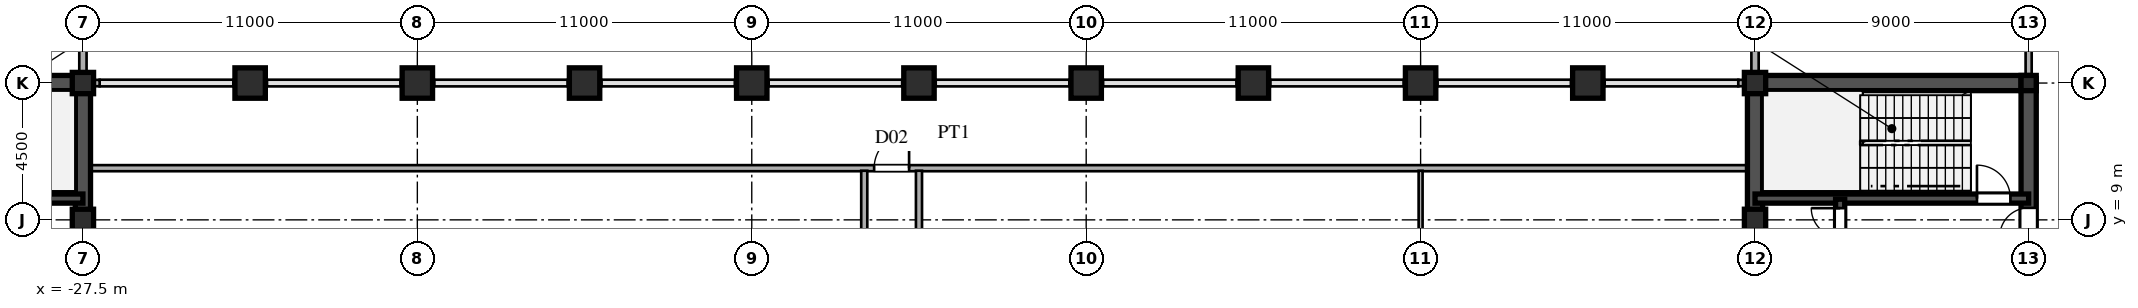
"""IFC4 building model, lengths in metres.
Left out: names, types, materials, properties, quantities, classifications, styles, units other than length and angle.
Written with IfcOpenShell. Run it as: python <this file> out.ifc"""

import sys

from ifc_helpers import new_model, si_unit, direction, frame, frame_2d, origin, origin_2d, place, context, subcontext, project, spatial, rectangle, hollow_rectangle, i_section, extrude, source, transform, mapped, element, fill, save


model = new_model("IFC4")
c1 = context("Model", 3, precision=1e-05, world=origin(), true_north=direction((0.0, 1.0)))
c2 = subcontext(c1, "Body", "Model", "MODEL_VIEW")
j1 = project(units=[si_unit("LENGTHUNIT", "METRE"), si_unit("PLANEANGLEUNIT", "RADIAN")], contexts=[c1])
p1 = place(None, origin())
s1 = spatial("IfcSite", under=j1, at=p1, CompositionType="ELEMENT")
p2 = place(p1, origin())
s2 = spatial("IfcBuilding", under=s1, at=p2, CompositionType="ELEMENT")
p3 = place(p2, frame((0.0, 0.0, 229.8)))
s3 = spatial("IfcBuildingStorey", under=s2, at=p3, CompositionType="ELEMENT", Elevation=229.8)
m1 = source(origin(), c2, "Body", "SweptSolid", [
    extrude(hollow_rectangle(XDim=0.7, YDim=0.7, WallThickness=0.03, at=origin_2d()), origin(), (0.0, 0.0, 1.0), 4.8),
])
for number, where, z_axis, x_axis in (
    (1, (-27.5, 9.0, 0.0), (0.0, 0.0, 1.0), (1.0, 0.0, 0.0)),
    (2, (-27.5, 13.5, 0.0), (0.0, 0.0, 1.0), (1.0, 0.0, 0.0)),
    (3, (27.5, 9.0, 0.0), (0.0, 0.0, 1.0), (1.0, 0.0, 0.0)),
    (4, (27.5, 13.5, 0.0), (0.0, 0.0, 1.0), (1.0, 0.0, 0.0)),
):
    element("IfcColumn", number, at=place(p3, frame(where, z_axis=z_axis, x_axis=x_axis)), inside=s3, PredefinedType="COLUMN", context=c2, shape_type="MappedRepresentation", body=[
        mapped(m1, transform((0.0, 0.0, 0.0), scale=1.0)),
    ])
m2 = source(origin(), c2, "Body", "SweptSolid", [
    extrude(i_section(OverallWidth=0.5, OverallDepth=0.5, WebThickness=0.02, FlangeThickness=0.032, at=origin_2d()), origin(), (0.0, 0.0, 1.0), 4.8),
])
p4 = place(p3, frame((36.5, 13.5, 0.0), z_axis=(0.0, 0.0, 1.0), x_axis=(1.0, 0.0, 0.0)))
e5 = element("IfcColumn", 5, at=p4, inside=s3, PredefinedType="COLUMN", context=c2, shape_type="MappedRepresentation", body=[
    mapped(m2, transform((0.0, 0.0, 0.0), scale=1.0)),
])
m3 = source(origin(), c2, "Body", "SweptSolid", [
    extrude(hollow_rectangle(XDim=1.0, YDim=1.0, WallThickness=0.042, at=origin_2d()), origin(), (0.0, 0.0, 1.0), 6.06),
])
for number, where, z_axis, x_axis in (
    (6, (-22.0, 13.5, -1.26), (0.0, 0.0, 1.0), (1.0, 0.0, 0.0)),
    (7, (-16.5, 13.5, -1.26), (0.0, 0.0, 1.0), (1.0, 0.0, 0.0)),
    (8, (-11.0, 13.5, -1.26), (0.0, 0.0, 1.0), (1.0, 0.0, 0.0)),
    (9, (-5.5, 13.5, -1.26), (0.0, 0.0, 1.0), (1.0, 0.0, 0.0)),
    (10, (0.0, 13.5, -1.26), (0.0, 0.0, 1.0), (1.0, 0.0, 0.0)),
    (11, (5.5, 13.5, -1.26), (0.0, 0.0, 1.0), (1.0, 0.0, 0.0)),
    (12, (11.0, 13.5, -1.26), (0.0, 0.0, 1.0), (1.0, 0.0, 0.0)),
    (13, (16.5, 13.5, -1.26), (0.0, 0.0, 1.0), (1.0, 0.0, 0.0)),
    (14, (22.0, 13.5, -1.26), (0.0, 0.0, 1.0), (1.0, 0.0, 0.0)),
):
    element("IfcColumn", number, at=place(p3, frame(where, z_axis=z_axis, x_axis=x_axis)), inside=s3, PredefinedType="COLUMN", context=c2, shape_type="MappedRepresentation", body=[
        mapped(m3, transform((0.0, 0.0, 0.0), scale=1.0)),
    ])
p5 = place(p3, frame((-27.5, 13.755, 0.0), z_axis=(0.0, 0.0, 1.0), x_axis=(0.0, 1.0, 0.0)))
e15 = element("IfcWall", 15, at=p5, inside=s3, PredefinedType="SOLIDWALL", context=c2, shape_type="SweptSolid", body=[
    extrude(rectangle(XDim=0.62, YDim=0.24, at=frame_2d((0.31, 0.0))), origin(), (0.0, 0.0, 1.0), 4.04),
])
p6 = place(p3, frame((-27.5, 14.375, 0.0), z_axis=(0.0, 0.0, 1.0), x_axis=(0.0, 1.0, 0.0)))
e16 = element("IfcWall", 16, at=p6, inside=s3, PredefinedType="SOLIDWALL", context=c2, shape_type="SweptSolid", body=[
    extrude(rectangle(XDim=1.605, YDim=0.24, at=frame_2d((0.803, 0.0))), origin(), (0.0, 0.0, 1.0), 4.54),
])
p7 = place(p3, frame((27.5, 13.755, 0.0), z_axis=(0.0, 0.0, 1.0), x_axis=(0.0, 1.0, 0.0)))
e17 = element("IfcWall", 17, at=p7, inside=s3, PredefinedType="SOLIDWALL", context=c2, shape_type="SweptSolid", body=[
    extrude(rectangle(XDim=0.62, YDim=0.24, at=frame_2d((0.31, 0.0))), origin(), (0.0, 0.0, 1.0), 4.04),
])
p8 = place(p3, frame((27.5, 14.375, 0.0), z_axis=(0.0, 0.0, 1.0), x_axis=(0.0, 1.0, 0.0)))
e18 = element("IfcWall", 18, at=p8, inside=s3, PredefinedType="SOLIDWALL", context=c2, shape_type="SweptSolid", body=[
    extrude(rectangle(XDim=1.605, YDim=0.24, at=frame_2d((0.803, 0.0))), origin(), (0.0, 0.0, 1.0), 4.54),
])
p9 = place(p3, frame((-27.49, 13.5, 0.0), z_axis=(0.0, 0.0, 1.0), x_axis=(1.0, 0.0, 0.0)))
e19 = element("IfcWall", 19, at=p9, inside=s3, PredefinedType="SOLIDWALL", context=c2, shape_type="SweptSolid", body=[
    extrude(rectangle(XDim=0.54, YDim=0.21, at=frame_2d((0.27, 0.0))), origin(), (0.0, 0.0, 1.0), 2.54),
])
for number, where, z_axis, x_axis in (
    (20, (-22.55, 13.5, 0.0), (0.0, 0.0, 1.0), (1.0, 0.0, 0.0)),
    (21, (-17.05, 13.5, 0.0), (0.0, 0.0, 1.0), (1.0, 0.0, 0.0)),
    (22, (-11.55, 13.5, 0.0), (0.0, 0.0, 1.0), (1.0, 0.0, 0.0)),
    (23, (-6.05, 13.5, 0.0), (0.0, 0.0, 1.0), (1.0, 0.0, 0.0)),
    (24, (-0.55, 13.5, 0.0), (0.0, 0.0, 1.0), (1.0, 0.0, 0.0)),
    (25, (4.95, 13.5, 0.0), (0.0, 0.0, 1.0), (1.0, 0.0, 0.0)),
    (26, (10.45, 13.5, 0.0), (0.0, 0.0, 1.0), (1.0, 0.0, 0.0)),
    (27, (15.95, 13.5, 0.0), (0.0, 0.0, 1.0), (1.0, 0.0, 0.0)),
    (28, (21.45, 13.5, 0.0), (0.0, 0.0, 1.0), (1.0, 0.0, 0.0)),
):
    element("IfcWall", number, at=place(p3, frame(where, z_axis=z_axis, x_axis=x_axis)), inside=s3, PredefinedType="SOLIDWALL", context=c2, shape_type="SweptSolid", body=[
        extrude(rectangle(XDim=1.1, YDim=0.21, at=frame_2d((0.55, 0.0))), origin(), (0.0, 0.0, 1.0), 2.54),
    ])
p10 = place(p3, frame((26.95, 13.5, 0.0), z_axis=(0.0, 0.0, 1.0), x_axis=(1.0, 0.0, 0.0)))
e29 = element("IfcWall", 29, at=p10, inside=s3, PredefinedType="SOLIDWALL", context=c2, shape_type="SweptSolid", body=[
    extrude(rectangle(XDim=0.54, YDim=0.21, at=frame_2d((0.27, 0.0))), origin(), (0.0, 0.0, 1.0), 2.54),
])
p11 = place(p3, frame((-27.5, 1.3, 0.0), z_axis=(0.0, 0.0, 1.0), x_axis=(0.0, 1.0, 0.0)))
e30 = element("IfcWall", 30, at=p11, inside=s3, PredefinedType="SHEAR", context=c2, shape_type="SweptSolid", body=[
    extrude(rectangle(XDim=12.2, YDim=0.5, at=frame_2d((6.1, 0.0))), origin(), (0.0, 0.0, 1.0), 4.54),
])
p12 = place(p3, frame((-36.5, 13.5, 0.0), z_axis=(0.0, 0.0, 1.0), x_axis=(1.0, 0.0, 0.0)))
e31 = element("IfcWall", 31, at=p12, inside=s3, PredefinedType="SHEAR", context=c2, shape_type="SweptSolid", body=[
    extrude(rectangle(XDim=9.0, YDim=0.5, at=frame_2d((4.5, 0.0))), origin(), (0.0, 0.0, 1.0), 4.54),
])
p13 = place(p3, frame((-36.5, 9.7, 0.0), z_axis=(0.0, 0.0, 1.0), x_axis=(1.0, 0.0, 0.0)))
e32 = element("IfcWall", 32, at=p13, inside=s3, PredefinedType="SHEAR", context=c2, shape_type="SweptSolid", body=[
    extrude(rectangle(XDim=9.0, YDim=0.3, at=frame_2d((4.5, 0.0))), origin(), (0.0, 0.0, 1.0), 4.54),
])
p14 = place(p13, frame((0.6, 0.0, 0.0)))
e33 = element("IfcOpeningElement", 33, at=p14, cuts=e32, PredefinedType="OPENING", context=c2, shape_type="SweptSolid", body=[
    extrude(rectangle(XDim=1.1, YDim=2.2, at=frame_2d((0.55, 1.1))), frame((0.0, 0.16, 0.0), z_axis=(0.0, -1.0, 0.0), x_axis=(1.0, 0.0, 0.0)), (0.0, 0.0, 1.0), 0.32),
])
p15 = place(p3, frame((27.5, 1.3, 0.0), z_axis=(0.0, 0.0, 1.0), x_axis=(0.0, 1.0, 0.0)))
e34 = element("IfcWall", 34, at=p15, inside=s3, PredefinedType="SHEAR", context=c2, shape_type="SweptSolid", body=[
    extrude(rectangle(XDim=12.2, YDim=0.5, at=frame_2d((6.1, 0.0))), origin(), (0.0, 0.0, 1.0), 4.54),
])
p16 = place(p3, frame((27.5, 13.5, 0.0), z_axis=(0.0, 0.0, 1.0), x_axis=(1.0, 0.0, 0.0)))
e35 = element("IfcWall", 35, at=p16, inside=s3, PredefinedType="SHEAR", context=c2, shape_type="SweptSolid", body=[
    extrude(rectangle(XDim=9.0, YDim=0.5, at=frame_2d((4.5, 0.0))), origin(), (0.0, 0.0, 1.0), 4.54),
])
p17 = place(p3, frame((36.5, 8.2, 0.0), z_axis=(0.0, 0.0, 1.0), x_axis=(0.0, 1.0, 0.0)))
e36 = element("IfcWall", 36, at=p17, inside=s3, PredefinedType="SHEAR", context=c2, shape_type="SweptSolid", body=[
    extrude(rectangle(XDim=5.45, YDim=0.5, at=frame_2d((2.725, 0.0))), origin(), (0.0, 0.0, 1.0), 4.54),
])
p18 = place(p17, frame((0.245, 0.0, 0.0)))
e37 = element("IfcOpeningElement", 37, at=p18, cuts=e36, PredefinedType="OPENING", context=c2, shape_type="SweptSolid", body=[
    extrude(rectangle(XDim=0.95, YDim=2.15, at=frame_2d((0.475, 1.075))), frame((0.0, 0.26, 0.0), z_axis=(0.0, -1.0, 0.0), x_axis=(1.0, 0.0, 0.0)), (0.0, 0.0, 1.0), 0.52),
])
p19 = place(p3, frame((27.5, 9.7, 0.0), z_axis=(0.0, 0.0, 1.0), x_axis=(1.0, 0.0, 0.0)))
e38 = element("IfcWall", 38, at=p19, inside=s3, PredefinedType="SHEAR", context=c2, shape_type="SweptSolid", body=[
    extrude(rectangle(XDim=9.0, YDim=0.3, at=frame_2d((4.5, 0.0))), origin(), (0.0, 0.0, 1.0), 4.54),
])
p20 = place(p19, frame((7.3, 0.0, 0.0)))
e39 = element("IfcOpeningElement", 39, at=p20, cuts=e38, PredefinedType="OPENING", context=c2, shape_type="SweptSolid", body=[
    extrude(rectangle(XDim=1.1, YDim=2.2, at=frame_2d((0.55, 1.1))), frame((0.0, 0.16, 0.0), z_axis=(0.0, -1.0, 0.0), x_axis=(1.0, 0.0, 0.0)), (0.0, 0.0, 1.0), 0.32),
])
p21 = place(p3, frame((30.3, 8.15, 0.0), z_axis=(0.0, 0.0, 1.0), x_axis=(0.0, 1.0, 0.0)))
e40 = element("IfcWall", 40, at=p21, inside=s3, PredefinedType="SHEAR", context=c2, shape_type="SweptSolid", body=[
    extrude(rectangle(XDim=1.53, YDim=0.3, at=frame_2d((0.765, 0.0))), origin(), (0.0, 0.0, 1.0), 4.54),
])
p22 = place(p21, frame((0.285, 0.0, 0.0)))
e41 = element("IfcOpeningElement", 41, at=p22, cuts=e40, PredefinedType="OPENING", context=c2, shape_type="SweptSolid", body=[
    extrude(rectangle(XDim=0.95, YDim=2.15, at=frame_2d((0.475, 1.075))), frame((0.0, 0.16, 0.0), z_axis=(0.0, -1.0, 0.0), x_axis=(1.0, 0.0, 0.0)), (0.0, 0.0, 1.0), 0.32),
])
p23 = place(p3, frame((-27.245, 10.7, 0.0), z_axis=(0.0, 0.0, 1.0), x_axis=(1.0, 0.0, 0.0)))
e42 = element("IfcWall", 42, at=p23, inside=s3, PredefinedType="PARTITIONING", context=c2, shape_type="SweptSolid", body=[
    extrude(rectangle(XDim=54.49, YDim=0.2, at=frame_2d((27.245, 0.0))), origin(), (0.0, 0.0, 1.0), 4.54),
])
p24 = place(p23, frame((25.77, 0.0, 0.0)))
e43 = element("IfcOpeningElement", 43, at=p24, cuts=e42, PredefinedType="OPENING", context=c2, shape_type="SweptSolid", body=[
    extrude(rectangle(XDim=1.15, YDim=2.2, at=frame_2d((0.575, 1.1))), frame((0.0, 0.11, 0.0), z_axis=(0.0, -1.0, 0.0), x_axis=(1.0, 0.0, 0.0)), (0.0, 0.0, 1.0), 0.22),
])
p25 = place(p3, frame((-1.8, 1.485, 0.0), z_axis=(0.0, 0.0, 1.0), x_axis=(0.0, 1.0, 0.0)))
e44 = element("IfcWall", 44, at=p25, inside=s3, PredefinedType="PARTITIONING", context=c2, shape_type="SweptSolid", body=[
    extrude(rectangle(XDim=9.13, YDim=0.2, at=frame_2d((4.565, 0.0))), origin(), (0.0, 0.0, 1.0), 4.54),
])
p26 = place(p3, frame((0.0, 2.98, 0.0), z_axis=(0.0, 0.0, 1.0), x_axis=(0.0, 1.0, 0.0)))
e45 = element("IfcWall", 45, at=p26, inside=s3, PredefinedType="PARTITIONING", context=c2, shape_type="SweptSolid", body=[
    extrude(rectangle(XDim=7.635, YDim=0.2, at=frame_2d((3.817, 0.0))), origin(), (0.0, 0.0, 1.0), 3.44),
])
p27 = place(p3, frame((16.5, 1.485, 0.0), z_axis=(0.0, 0.0, 1.0), x_axis=(0.0, 1.0, 0.0)))
e46 = element("IfcWall", 46, at=p27, inside=s3, PredefinedType="PARTITIONING", context=c2, shape_type="SweptSolid", body=[
    extrude(rectangle(XDim=9.13, YDim=0.13, at=frame_2d((4.565, 0.0))), origin(), (0.0, 0.0, 1.0), 3.44),
])
p28 = place(p27, frame((5.59, 0.0, 0.0)))
e47 = element("IfcOpeningElement", 47, at=p28, cuts=e46, PredefinedType="OPENING", context=c2, shape_type="SweptSolid", body=[
    extrude(rectangle(XDim=0.95, YDim=2.15, at=frame_2d((0.475, 1.075))), frame((0.0, 0.075, 0.0), z_axis=(0.0, -1.0, 0.0), x_axis=(1.0, 0.0, 0.0)), (0.0, 0.0, 1.0), 0.15),
])
p29 = place(p3, frame((36.5, 13.755, 0.0), z_axis=(0.0, 0.0, 1.0), x_axis=(0.0, 1.0, 0.0)))
e48 = element("IfcWall", 48, at=p29, inside=s3, PredefinedType="PARTITIONING", context=c2, shape_type="SweptSolid", body=[
    extrude(rectangle(XDim=1.76, YDim=0.2, at=frame_2d((0.88, 0.0))), origin(), (0.0, 0.0, 1.0), 3.94),
])
m4 = source(origin(), c2, "Body", "SweptSolid", [
    extrude(rectangle(XDim=0.95, YDim=2.15, at=frame_2d((0.475, 1.075))), frame((0.0, 0.025, 0.0), z_axis=(0.0, -1.0, 0.0), x_axis=(1.0, 0.0, 0.0)), (0.0, 0.0, 1.0), 0.05),
])
p30 = place(p18, origin())
e49 = element("IfcDoor", 49, at=p30, inside=s3, OperationType="SINGLE_SWING_LEFT", PredefinedType="DOOR", context=c2, shape_type="MappedRepresentation", body=[
    mapped(m4, transform((0.0, 0.0, 0.0), scale=1.0)),
])
fill(e37, e49)
m5 = source(origin(), c2, "Body", "SweptSolid", [
    extrude(rectangle(XDim=1.1, YDim=2.2, at=frame_2d((0.55, 1.1))), frame((0.0, 0.025, 0.0), z_axis=(0.0, -1.0, 0.0), x_axis=(1.0, 0.0, 0.0)), (0.0, 0.0, 1.0), 0.05),
])
p31 = place(p20, origin())
e50 = element("IfcDoor", 50, at=p31, inside=s3, OperationType="SINGLE_SWING_LEFT", PredefinedType="DOOR", context=c2, shape_type="MappedRepresentation", body=[
    mapped(m5, transform((0.0, 0.0, 0.0), scale=1.0)),
])
fill(e39, e50)
p32 = place(p22, origin())
e51 = element("IfcDoor", 51, at=p32, inside=s3, OperationType="SINGLE_SWING_RIGHT", PredefinedType="DOOR", context=c2, shape_type="MappedRepresentation", body=[
    mapped(m4, transform((0.0, 0.0, 0.0), scale=1.0)),
])
fill(e41, e51)
m6 = source(origin(), c2, "Body", "SweptSolid", [
    extrude(rectangle(XDim=1.15, YDim=2.2, at=frame_2d((0.575, 1.1))), frame((0.0, 0.025, 0.0), z_axis=(0.0, -1.0, 0.0), x_axis=(1.0, 0.0, 0.0)), (0.0, 0.0, 1.0), 0.05),
])
p33 = place(p24, origin())
e52 = element("IfcDoor", 52, at=p33, inside=s3, OperationType="SINGLE_SWING_RIGHT", PredefinedType="DOOR", context=c2, shape_type="MappedRepresentation", body=[
    mapped(m6, transform((0.0, 0.0, 0.0), scale=1.0)),
])
fill(e43, e52)
save(model, sys.argv[1])
